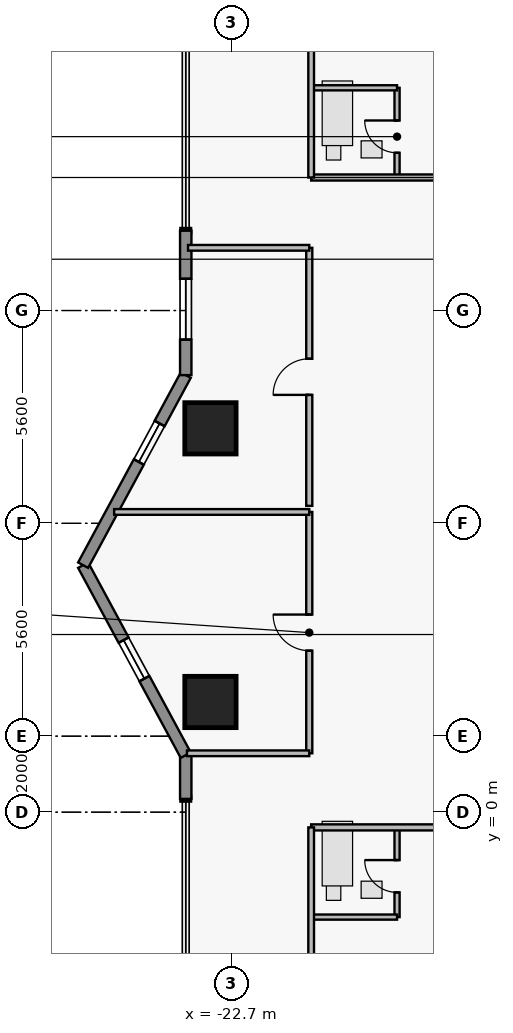
"""IFC4 building model, lengths in metres.
Left out: names, types, materials, properties, quantities, classifications, styles, units other than length and angle.
Written with IfcOpenShell. Run it as: python <this file> out.ifc"""

import sys

from ifc_helpers import new_model, si_unit, direction, frame, frame_2d, origin, origin_2d, place, context, subcontext, project, spatial, rectangle, extrude, element, fill, save


model = new_model("IFC4")
c1 = context("Model", 3, precision=1e-05, world=origin(), true_north=direction((0.0, 1.0)))
c2 = subcontext(c1, "Body", "Model", "MODEL_VIEW")
j1 = project(units=[si_unit("LENGTHUNIT", "METRE"), si_unit("PLANEANGLEUNIT", "RADIAN")], contexts=[c1])
p1 = place(None, origin())
s1 = spatial("IfcSite", under=j1, at=p1, CompositionType="ELEMENT")
p2 = place(p1, origin())
s2 = spatial("IfcBuilding", under=s1, at=p2, CompositionType="ELEMENT")
p3 = place(p2, frame((0.0, 0.0, 99.3)))
s3 = spatial("IfcBuildingStorey", under=s2, at=p3, CompositionType="ELEMENT", Elevation=99.3)
for number, where, z_axis, x_axis in (
    (1, (-23.25, 2.9, 0.0), (0.0, 0.0, 1.0), (1.0, 0.0, 0.0)),
    (2, (-23.25, 10.1, 0.0), (0.0, 0.0, 1.0), (1.0, 0.0, 0.0)),
):
    element("IfcColumn", number, at=place(p3, frame(where, z_axis=z_axis, x_axis=x_axis)), inside=s3, PredefinedType="COLUMN", context=c2, shape_type="SweptSolid", body=[
        extrude(rectangle(XDim=1.35, YDim=1.35, at=origin_2d()), origin(), (0.0, 0.0, 1.0), 3.65),
    ])
p4 = place(p3, frame((-23.9, 0.35, 0.0), z_axis=(0.0, 0.0, 1.0), x_axis=(0.0, 1.0, 0.0)))
e3 = element("IfcWall", 3, at=p4, inside=s3, PredefinedType="STANDARD", context=c2, shape_type="SweptSolid", body=[
    extrude(rectangle(XDim=1.15, YDim=0.3, at=frame_2d((0.575, 0.0))), origin(), (0.0, 0.0, 1.0), 3.43),
])
p5 = place(p3, frame((-23.9, 1.5, 0.0), z_axis=(0.0, 0.0, 1.0), x_axis=(-0.475175525499, 0.879891027325, 0.0)))
e4 = element("IfcWall", 4, at=p5, inside=s3, PredefinedType="STANDARD", context=c2, shape_type="SweptSolid", body=[
    extrude(rectangle(XDim=5.683, YDim=0.3, at=frame_2d((2.841, 0.0))), origin(), (0.0, 0.0, 1.0), 3.43),
])
p6 = place(p5, frame((2.29, 0.0, 1.25)))
e5 = element("IfcOpeningElement", 5, at=p6, cuts=e4, PredefinedType="OPENING", context=c2, shape_type="SweptSolid", body=[
    extrude(rectangle(XDim=1.15, YDim=1.55, at=frame_2d((0.575, 0.775))), frame((0.0, 0.16, 0.0), z_axis=(0.0, -1.0, 0.0), x_axis=(1.0, 0.0, 0.0)), (0.0, 0.0, 1.0), 0.32),
])
p7 = place(p3, frame((-26.6, 6.5, 0.0), z_axis=(0.0, 0.0, 1.0), x_axis=(0.475175525499, 0.879891027325, 0.0)))
e6 = element("IfcWall", 6, at=p7, inside=s3, PredefinedType="STANDARD", context=c2, shape_type="SweptSolid", body=[
    extrude(rectangle(XDim=5.683, YDim=0.3, at=frame_2d((2.841, 0.0))), origin(), (0.0, 0.0, 1.0), 3.43),
])
p8 = place(p7, frame((3.086, 0.0, 1.25)))
e7 = element("IfcOpeningElement", 7, at=p8, cuts=e6, PredefinedType="OPENING", context=c2, shape_type="SweptSolid", body=[
    extrude(rectangle(XDim=1.15, YDim=1.55, at=frame_2d((0.575, 0.775))), frame((0.0, 0.16, 0.0), z_axis=(0.0, -1.0, 0.0), x_axis=(1.0, 0.0, 0.0)), (0.0, 0.0, 1.0), 0.32),
])
p9 = place(p3, frame((-23.9, 11.5, 0.0), z_axis=(0.0, 0.0, 1.0), x_axis=(0.0, 1.0, 0.0)))
e8 = element("IfcWall", 8, at=p9, inside=s3, PredefinedType="STANDARD", context=c2, shape_type="SweptSolid", body=[
    extrude(rectangle(XDim=3.8, YDim=0.3, at=frame_2d((1.9, 0.0))), origin(), (0.0, 0.0, 1.0), 3.43),
])
p10 = place(p9, frame((0.935, 0.0, 0.85)))
e9 = element("IfcOpeningElement", 9, at=p10, cuts=e8, PredefinedType="OPENING", context=c2, shape_type="SweptSolid", body=[
    extrude(rectangle(XDim=1.6, YDim=1.8, at=frame_2d((0.8, 0.9))), frame((0.0, 0.16, 0.0), z_axis=(0.0, -1.0, 0.0), x_axis=(1.0, 0.0, 0.0)), (0.0, 0.0, 1.0), 0.32),
])
p11 = place(p3, frame((-18.34, 16.7, 0.0), z_axis=(0.0, 0.0, 1.0), x_axis=(0.0, 1.0, 0.0)))
e10 = element("IfcWall", 10, at=p11, inside=s3, PredefinedType="PLUMBINGWALL", context=c2, shape_type="SweptSolid", body=[
    extrude(rectangle(XDim=2.36, YDim=0.135, at=frame_2d((1.18, 0.0))), origin(), (0.0, 0.0, 1.0), 3.43),
])
p12 = place(p11, frame((0.65, 0.0, 0.0)))
e11 = element("IfcOpeningElement", 11, at=p12, cuts=e10, PredefinedType="OPENING", context=c2, shape_type="SweptSolid", body=[
    extrude(rectangle(XDim=0.85, YDim=2.1, at=frame_2d((0.425, 1.05))), frame((0.0, 0.077, 0.0), z_axis=(0.0, -1.0, 0.0), x_axis=(1.0, 0.0, 0.0)), (0.0, 0.0, 1.0), 0.155),
])
p13 = place(p3, frame((-20.6, 16.7, 0.0), z_axis=(0.0, 0.0, 1.0), x_axis=(1.0, 0.0, 0.0)))
e12 = element("IfcWall", 12, at=p13, inside=s3, PredefinedType="PARTITIONING", context=c2, shape_type="SweptSolid", body=[
    extrude(rectangle(XDim=8.2, YDim=0.16, at=frame_2d((4.1, 0.0))), origin(), (0.0, 0.0, 1.0), 2.973),
])
p14 = place(p13, frame((4.75, 0.0, 0.0)))
e13 = element("IfcOpeningElement", 13, at=p14, cuts=e12, PredefinedType="OPENING", context=c2, shape_type="SweptSolid", body=[
    extrude(rectangle(XDim=1.0, YDim=2.15, at=frame_2d((0.5, 1.075))), frame((0.0, 0.09, 0.0), z_axis=(0.0, -1.0, 0.0), x_axis=(1.0, 0.0, 0.0)), (0.0, 0.0, 1.0), 0.18),
])
p15 = place(p3, frame((-18.34, -2.76, 0.0), z_axis=(0.0, 0.0, 1.0), x_axis=(0.0, 1.0, 0.0)))
e14 = element("IfcWall", 14, at=p15, inside=s3, PredefinedType="PLUMBINGWALL", context=c2, shape_type="SweptSolid", body=[
    extrude(rectangle(XDim=2.36, YDim=0.135, at=frame_2d((1.18, 0.0))), origin(), (0.0, 0.0, 1.0), 3.43),
])
p16 = place(p15, frame((0.65, 0.0, 0.0)))
e15 = element("IfcOpeningElement", 15, at=p16, cuts=e14, PredefinedType="OPENING", context=c2, shape_type="SweptSolid", body=[
    extrude(rectangle(XDim=0.85, YDim=2.1, at=frame_2d((0.425, 1.05))), frame((0.0, 0.077, 0.0), z_axis=(0.0, -1.0, 0.0), x_axis=(1.0, 0.0, 0.0)), (0.0, 0.0, 1.0), 0.155),
])
p17 = place(p3, frame((-20.6, -0.4, 0.0), z_axis=(0.0, 0.0, 1.0), x_axis=(1.0, 0.0, 0.0)))
e16 = element("IfcWall", 16, at=p17, inside=s3, PredefinedType="PARTITIONING", context=c2, shape_type="SweptSolid", body=[
    extrude(rectangle(XDim=9.4, YDim=0.16, at=frame_2d((4.7, 0.0))), origin(), (0.0, 0.0, 1.0), 3.43),
])
p18 = place(p17, frame((5.35, 0.0, 0.0)))
e17 = element("IfcOpeningElement", 17, at=p18, cuts=e16, PredefinedType="OPENING", context=c2, shape_type="SweptSolid", body=[
    extrude(rectangle(XDim=1.0, YDim=2.15, at=frame_2d((0.5, 1.075))), frame((0.0, 0.09, 0.0), z_axis=(0.0, -1.0, 0.0), x_axis=(1.0, 0.0, 0.0)), (0.0, 0.0, 1.0), 0.18),
])
p19 = place(p3, frame((-20.65, 1.55, 0.0), z_axis=(0.0, 0.0, 1.0), x_axis=(0.0, 1.0, 0.0)))
e18 = element("IfcWall", 18, at=p19, inside=s3, PredefinedType="PARTITIONING", context=c2, shape_type="SweptSolid", body=[
    extrude(rectangle(XDim=6.35, YDim=0.16, at=frame_2d((3.175, 0.0))), origin(), (0.0, 0.0, 1.0), 3.43),
])
p20 = place(p19, frame((2.7, 0.0, 0.0)))
e19 = element("IfcOpeningElement", 19, at=p20, cuts=e18, PredefinedType="OPENING", context=c2, shape_type="SweptSolid", body=[
    extrude(rectangle(XDim=0.95, YDim=2.15, at=frame_2d((0.475, 1.075))), frame((0.0, 0.09, 0.0), z_axis=(0.0, -1.0, 0.0), x_axis=(1.0, 0.0, 0.0)), (0.0, 0.0, 1.0), 0.18),
])
p21 = place(p3, frame((-20.65, 8.06, 0.0), z_axis=(0.0, 0.0, 1.0), x_axis=(0.0, 1.0, 0.0)))
e20 = element("IfcWall", 20, at=p21, inside=s3, PredefinedType="PARTITIONING", context=c2, shape_type="SweptSolid", body=[
    extrude(rectangle(XDim=6.79, YDim=0.16, at=frame_2d((3.395, 0.0))), origin(), (0.0, 0.0, 1.0), 3.43),
])
p22 = place(p21, frame((2.92, 0.0, 0.0)))
e21 = element("IfcOpeningElement", 21, at=p22, cuts=e20, PredefinedType="OPENING", context=c2, shape_type="SweptSolid", body=[
    extrude(rectangle(XDim=0.95, YDim=2.15, at=frame_2d((0.475, 1.075))), frame((0.0, 0.09, 0.0), z_axis=(0.0, -1.0, 0.0), x_axis=(1.0, 0.0, 0.0)), (0.0, 0.0, 1.0), 0.18),
])
p23 = place(p3, frame((-20.6, 19.06, 0.0), z_axis=(0.0, 0.0, 1.0), x_axis=(1.0, 0.0, 0.0)))
e22 = element("IfcWall", 22, at=p23, inside=s3, PredefinedType="PLUMBINGWALL", context=c2, shape_type="SweptSolid", body=[
    extrude(rectangle(XDim=2.26, YDim=0.135, at=frame_2d((1.13, 0.0))), origin(), (0.0, 0.0, 1.0), 3.43),
])
p24 = place(p3, frame((-20.6, 16.7, 0.0), z_axis=(0.0, 0.0, 1.0), x_axis=(0.0, 1.0, 0.0)))
e23 = element("IfcWall", 23, at=p24, inside=s3, PredefinedType="PARTITIONING", context=c2, shape_type="SweptSolid", body=[
    extrude(rectangle(XDim=8.2, YDim=0.15, at=frame_2d((4.1, 0.0))), origin(), (0.0, 0.0, 1.0), 3.43),
])
p25 = place(p3, frame((-20.6, -2.76, 0.0), z_axis=(0.0, 0.0, 1.0), x_axis=(1.0, 0.0, 0.0)))
e24 = element("IfcWall", 24, at=p25, inside=s3, PredefinedType="PLUMBINGWALL", context=c2, shape_type="SweptSolid", body=[
    extrude(rectangle(XDim=2.26, YDim=0.135, at=frame_2d((1.13, 0.0))), origin(), (0.0, 0.0, 1.0), 3.43),
])
p26 = place(p3, frame((-20.6, -11.9, 0.0), z_axis=(0.0, 0.0, 1.0), x_axis=(0.0, 1.0, 0.0)))
e25 = element("IfcWall", 25, at=p26, inside=s3, PredefinedType="PARTITIONING", context=c2, shape_type="SweptSolid", body=[
    extrude(rectangle(XDim=11.5, YDim=0.15, at=frame_2d((5.75, 0.0))), origin(), (0.0, 0.0, 1.0), 3.43),
])
p27 = place(p3, frame((-23.867, 1.55, 0.0), z_axis=(0.0, 0.0, 1.0), x_axis=(1.0, 0.0, 0.0)))
e26 = element("IfcWall", 26, at=p27, inside=s3, PredefinedType="PARTITIONING", context=c2, shape_type="SweptSolid", body=[
    extrude(rectangle(XDim=3.217, YDim=0.15, at=frame_2d((1.608, 0.0))), origin(), (0.0, 0.0, 1.0), 3.43),
])
p28 = place(p3, frame((-25.784, 7.9, 0.0), z_axis=(0.0, 0.0, 1.0), x_axis=(1.0, 0.0, 0.0)))
e27 = element("IfcWall", 27, at=p28, inside=s3, PredefinedType="PARTITIONING", context=c2, shape_type="SweptSolid", body=[
    extrude(rectangle(XDim=5.134, YDim=0.15, at=frame_2d((2.567, 0.0))), origin(), (0.0, 0.0, 1.0), 3.43),
])
p29 = place(p3, frame((-23.84, 14.85, 0.0), z_axis=(0.0, 0.0, 1.0), x_axis=(1.0, 0.0, 0.0)))
e28 = element("IfcWall", 28, at=p29, inside=s3, PredefinedType="PARTITIONING", context=c2, shape_type="SweptSolid", body=[
    extrude(rectangle(XDim=3.19, YDim=0.15, at=frame_2d((1.595, 0.0))), origin(), (0.0, 0.0, 1.0), 3.43),
])
p30 = place(p6, origin())
e29 = element("IfcWindow", 29, at=p30, inside=s3, PartitioningType="SINGLE_PANEL", PredefinedType="WINDOW", context=c2, shape_type="SweptSolid", body=[
    extrude(rectangle(XDim=1.15, YDim=1.55, at=frame_2d((0.575, 0.775))), frame((0.0, 0.03, 0.0), z_axis=(0.0, -1.0, 0.0), x_axis=(1.0, 0.0, 0.0)), (0.0, 0.0, 1.0), 0.06),
])
fill(e5, e29)
p31 = place(p8, origin())
e30 = element("IfcWindow", 30, at=p31, inside=s3, PartitioningType="SINGLE_PANEL", PredefinedType="WINDOW", context=c2, shape_type="SweptSolid", body=[
    extrude(rectangle(XDim=1.15, YDim=1.55, at=frame_2d((0.575, 0.775))), frame((0.0, 0.03, 0.0), z_axis=(0.0, -1.0, 0.0), x_axis=(1.0, 0.0, 0.0)), (0.0, 0.0, 1.0), 0.06),
])
fill(e7, e30)
p32 = place(p10, origin())
e31 = element("IfcWindow", 31, at=p32, inside=s3, PartitioningType="SINGLE_PANEL", PredefinedType="WINDOW", context=c2, shape_type="SweptSolid", body=[
    extrude(rectangle(XDim=1.6, YDim=1.8, at=frame_2d((0.8, 0.9))), frame((0.0, 0.03, 0.0), z_axis=(0.0, -1.0, 0.0), x_axis=(1.0, 0.0, 0.0)), (0.0, 0.0, 1.0), 0.06),
])
fill(e9, e31)
p33 = place(p12, origin())
e32 = element("IfcDoor", 32, at=p33, inside=s3, OperationType="SINGLE_SWING_RIGHT", PredefinedType="DOOR", context=c2, shape_type="SweptSolid", body=[
    extrude(rectangle(XDim=0.85, YDim=2.1, at=frame_2d((0.425, 1.05))), frame((0.0, 0.025, 0.0), z_axis=(0.0, -1.0, 0.0), x_axis=(1.0, 0.0, 0.0)), (0.0, 0.0, 1.0), 0.05),
])
fill(e11, e32)
p34 = place(p16, origin())
e33 = element("IfcDoor", 33, at=p34, inside=s3, OperationType="SINGLE_SWING_RIGHT", PredefinedType="DOOR", context=c2, shape_type="SweptSolid", body=[
    extrude(rectangle(XDim=0.85, YDim=2.1, at=frame_2d((0.425, 1.05))), frame((0.0, 0.025, 0.0), z_axis=(0.0, -1.0, 0.0), x_axis=(1.0, 0.0, 0.0)), (0.0, 0.0, 1.0), 0.05),
])
fill(e15, e33)
p35 = place(p20, origin())
e34 = element("IfcDoor", 34, at=p35, inside=s3, OperationType="SINGLE_SWING_RIGHT", PredefinedType="DOOR", context=c2, shape_type="SweptSolid", body=[
    extrude(rectangle(XDim=0.95, YDim=2.15, at=frame_2d((0.475, 1.075))), frame((0.0, 0.025, 0.0), z_axis=(0.0, -1.0, 0.0), x_axis=(1.0, 0.0, 0.0)), (0.0, 0.0, 1.0), 0.05),
])
fill(e19, e34)
p36 = place(p22, origin())
e35 = element("IfcDoor", 35, at=p36, inside=s3, OperationType="SINGLE_SWING_LEFT", PredefinedType="DOOR", context=c2, shape_type="SweptSolid", body=[
    extrude(rectangle(XDim=0.95, YDim=2.15, at=frame_2d((0.475, 1.075))), frame((0.0, 0.025, 0.0), z_axis=(0.0, -1.0, 0.0), x_axis=(1.0, 0.0, 0.0)), (0.0, 0.0, 1.0), 0.05),
])
fill(e21, e35)
save(model, sys.argv[1])
